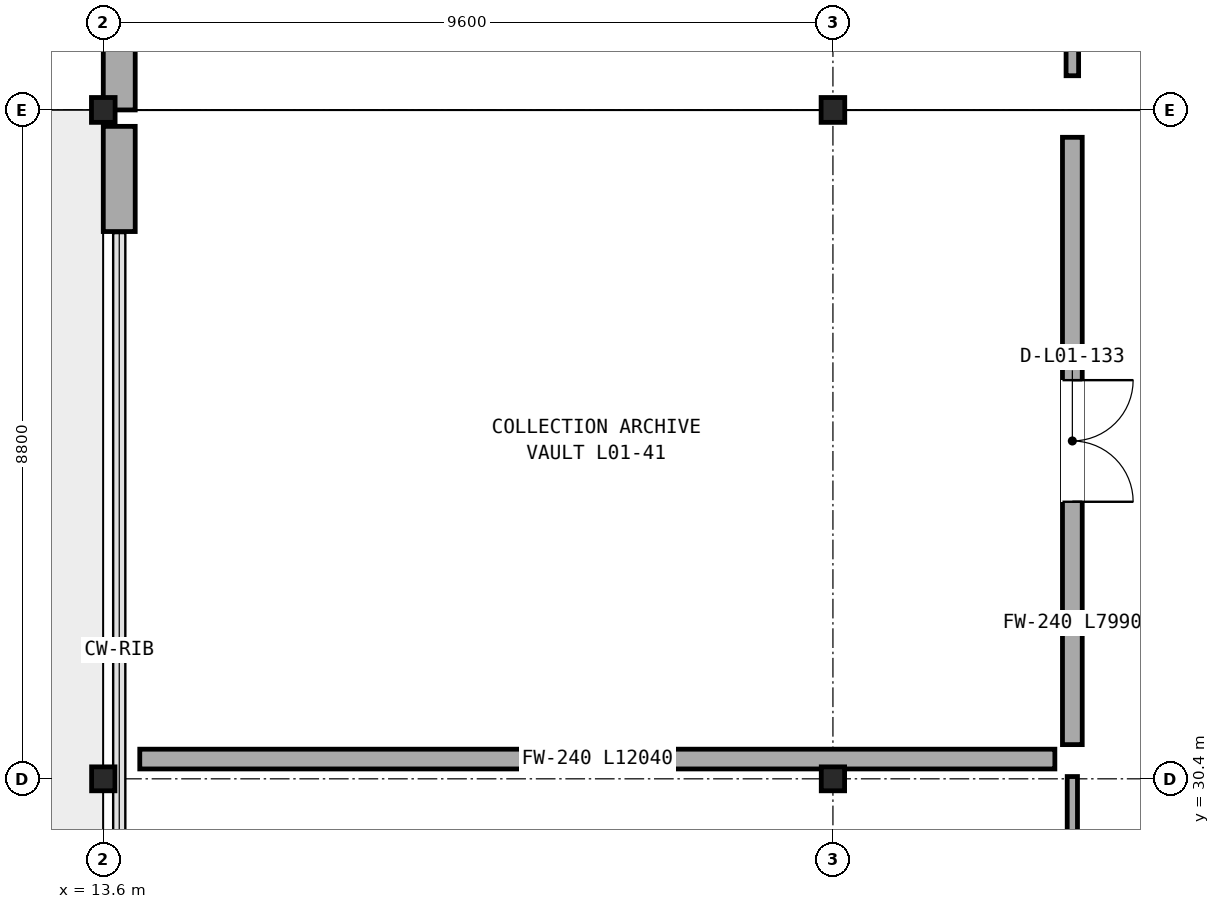
"""IFC4 building model, lengths in metres.
Left out: names, types, materials, properties, quantities, classifications, styles, units other than length and angle.
Written with IfcOpenShell. Run it as: python <this file> out.ifc"""

import sys

from ifc_helpers import new_model, si_unit, direction, frame, frame_2d, origin, origin_2d, place, context, subcontext, project, spatial, rectangle, i_section, extrude, element, fill, save


model = new_model("IFC4")
c1 = context("Model", 3, precision=1e-05, world=origin(), true_north=direction((0.0, 1.0)))
c2 = subcontext(c1, "Body", "Model", "MODEL_VIEW")
j1 = project(units=[si_unit("LENGTHUNIT", "METRE"), si_unit("PLANEANGLEUNIT", "RADIAN")], contexts=[c1])
p1 = place(None, origin())
s1 = spatial("IfcSite", under=j1, at=p1, CompositionType="ELEMENT")
p2 = place(p1, origin())
s2 = spatial("IfcBuilding", under=s1, at=p2, CompositionType="ELEMENT")
p3 = place(p2, frame((0.0, 0.0, 5.6)))
s3 = spatial("IfcBuildingStorey", under=s2, at=p3, CompositionType="ELEMENT", Elevation=5.6)
p4 = place(p3, frame((13.6, 30.4, 0.0), z_axis=(0.0, 0.0, 1.0), x_axis=(1.0, 0.0, 0.0)))
e1 = element("IfcColumn", 1, at=p4, inside=s3, PredefinedType="COLUMN", context=c2, shape_type="SweptSolid", body=[
    extrude(i_section(OverallWidth=0.307, OverallDepth=0.315, WebThickness=0.012, FlangeThickness=0.019, FilletRadius=0.017, at=origin_2d()), origin(), (0.0, 0.0, 1.0), 4.5),
])
p5 = place(p3, frame((13.6, 39.2, 0.0), z_axis=(0.0, 0.0, 1.0), x_axis=(1.0, 0.0, 0.0)))
e2 = element("IfcColumn", 2, at=p5, inside=s3, PredefinedType="COLUMN", context=c2, shape_type="SweptSolid", body=[
    extrude(i_section(OverallWidth=0.311, OverallDepth=0.327, WebThickness=0.016, FlangeThickness=0.025, FilletRadius=0.017, at=origin_2d()), origin(), (0.0, 0.0, 1.0), 4.5),
])
p6 = place(p3, frame((23.2, 30.4, 0.0), z_axis=(0.0, 0.0, 1.0), x_axis=(1.0, 0.0, 0.0)))
e3 = element("IfcColumn", 3, at=p6, inside=s3, PredefinedType="COLUMN", context=c2, shape_type="SweptSolid", body=[
    extrude(i_section(OverallWidth=0.307, OverallDepth=0.315, WebThickness=0.012, FlangeThickness=0.019, FilletRadius=0.017, at=origin_2d()), origin(), (0.0, 0.0, 1.0), 4.5),
])
p7 = place(p3, frame((23.2, 39.2, 0.0), z_axis=(0.0, 0.0, 1.0), x_axis=(1.0, 0.0, 0.0)))
e4 = element("IfcColumn", 4, at=p7, inside=s3, PredefinedType="COLUMN", context=c2, shape_type="SweptSolid", body=[
    extrude(i_section(OverallWidth=0.311, OverallDepth=0.327, WebThickness=0.016, FlangeThickness=0.025, FilletRadius=0.017, at=origin_2d()), origin(), (0.0, 0.0, 1.0), 4.5),
])
p8 = place(p3, frame((13.81, 91.784, 0.0), z_axis=(0.0, 0.0, 1.0), x_axis=(0.0, -1.0, 0.0)))
e5 = element("IfcWall", 5, at=p8, inside=s3, PredefinedType="SOLIDWALL", context=c2, shape_type="SweptSolid", body=[
    extrude(rectangle(XDim=52.584, YDim=0.42, at=frame_2d((26.292, 0.0))), origin(), (0.0, 0.0, 1.0), 3.205),
])
p9 = place(p3, frame((13.81, 38.984, 0.0), z_axis=(0.0, 0.0, 1.0), x_axis=(0.0, -1.0, 0.0)))
e6 = element("IfcWall", 6, at=p9, inside=s3, PredefinedType="SOLIDWALL", context=c2, shape_type="SweptSolid", body=[
    extrude(rectangle(XDim=1.384, YDim=0.42, at=frame_2d((0.692, 0.0))), origin(), (0.0, 0.0, 1.0), 3.598),
])
p10 = place(p3, frame((26.35, 50.92, 0.0), z_axis=(0.0, 0.0, 1.0), x_axis=(0.0, -1.0, 0.0)))
e7 = element("IfcWall", 7, at=p10, inside=s3, PredefinedType="PARTITIONING", context=c2, shape_type="SweptSolid", body=[
    extrude(rectangle(XDim=11.27, YDim=0.165, at=frame_2d((5.635, 0.0))), origin(), (0.0, 0.0, 1.0), 3.583),
])
p11 = place(p3, frame((26.35, 30.43, 0.0), z_axis=(0.0, 0.0, 1.0), x_axis=(0.0, -1.0, 0.0)))
e8 = element("IfcWall", 8, at=p11, inside=s3, PredefinedType="PARTITIONING", context=c2, shape_type="SweptSolid", body=[
    extrude(rectangle(XDim=2.55, YDim=0.135, at=frame_2d((1.275, 0.0))), origin(), (0.0, 0.0, 1.0), 3.653),
])
p12 = place(p3, frame((26.35, 38.84, 0.0), z_axis=(0.0, 0.0, 1.0), x_axis=(0.0, -1.0, 0.0)))
e9 = element("IfcWall", 9, at=p12, inside=s3, PredefinedType="SOLIDWALL", context=c2, shape_type="SweptSolid", body=[
    extrude(rectangle(XDim=7.99, YDim=0.26, at=frame_2d((3.995, 0.0))), origin(), (0.0, 0.0, 1.0), 4.13),
])
p13 = place(p12, frame((3.195, 0.0, 0.0)))
e10 = element("IfcOpeningElement", 10, at=p13, cuts=e9, PredefinedType="OPENING", context=c2, shape_type="SweptSolid", body=[
    extrude(rectangle(XDim=1.6, YDim=2.4, at=frame_2d((0.8, 1.2))), frame((0.0, 0.14, 0.0), z_axis=(0.0, -1.0, 0.0), x_axis=(1.0, 0.0, 0.0)), (0.0, 0.0, 1.0), 0.28),
])
p14 = place(p3, frame((14.08, 30.66, 0.0), z_axis=(0.0, 0.0, 1.0), x_axis=(1.0, 0.0, 0.0)))
e11 = element("IfcWall", 11, at=p14, inside=s3, PredefinedType="SOLIDWALL", context=c2, shape_type="SweptSolid", body=[
    extrude(rectangle(XDim=12.04, YDim=0.26, at=frame_2d((6.02, 0.0))), origin(), (0.0, 0.0, 1.0), 2.9),
])
p15 = place(p13, origin())
e12 = element("IfcDoor", 12, at=p15, inside=s3, OperationType="DOUBLE_DOOR_SINGLE_SWING", PredefinedType="DOOR", context=c2, shape_type="SweptSolid", body=[
    extrude(rectangle(XDim=1.6, YDim=2.4, at=frame_2d((0.8, 1.2))), frame((0.0, 0.025, 0.0), z_axis=(0.0, -1.0, 0.0), x_axis=(1.0, 0.0, 0.0)), (0.0, 0.0, 1.0), 0.05),
])
fill(e10, e12)
save(model, sys.argv[1])
